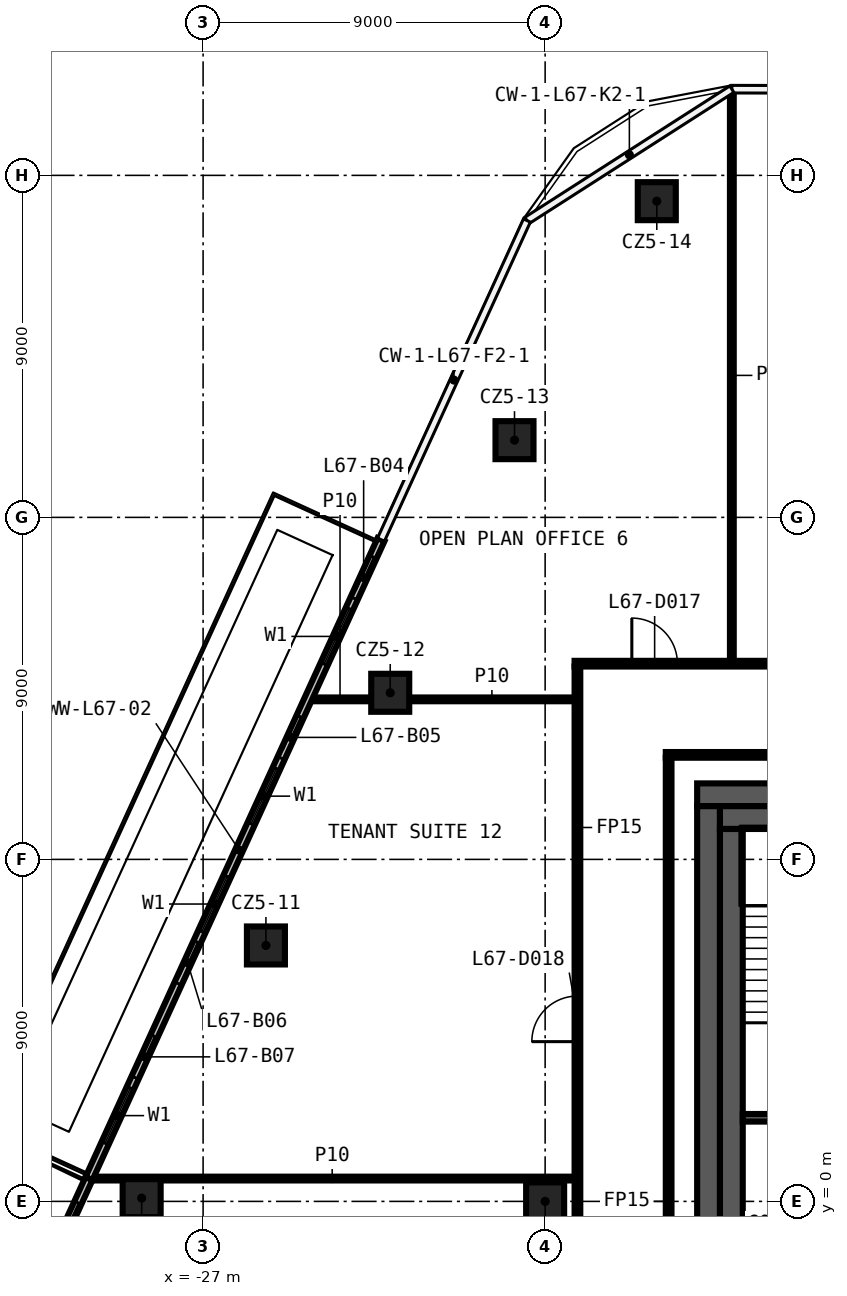
"""IFC4 building model, lengths in metres.
Left out: names, types, materials, properties, quantities, classifications, styles, units other than length and angle.
Written with IfcOpenShell. Run it as: python <this file> out.ifc"""

import sys

from ifc_helpers import new_model, si_unit, direction, frame, frame_2d, origin, origin_2d, place, context, subcontext, project, spatial, rectangle, extrude, element, fill, save


model = new_model("IFC4")
c1 = context("Model", 3, precision=1e-05, world=origin(), true_north=direction((0.0, 1.0)))
c2 = subcontext(c1, "Body", "Model", "MODEL_VIEW")
j1 = project(units=[si_unit("LENGTHUNIT", "METRE"), si_unit("PLANEANGLEUNIT", "RADIAN")], contexts=[c1])
p1 = place(None, origin())
s1 = spatial("IfcSite", under=j1, at=p1, CompositionType="ELEMENT")
p2 = place(p1, origin())
s2 = spatial("IfcBuilding", under=s1, at=p2, CompositionType="ELEMENT")
p3 = place(p2, frame((0.0, 0.0, 315.2)))
s3 = spatial("IfcBuildingStorey", under=s2, at=p3, CompositionType="ELEMENT", Elevation=315.2)
for number, where, z_axis, x_axis in (
    (1, (-28.617, 0.086, 0.0), (0.0, 0.0, 1.0), (1.0, 0.0, 0.0)),
    (2, (-25.347, 6.735, 0.0), (0.0, 0.0, 1.0), (1.0, 0.0, 0.0)),
    (3, (-22.076, 13.384, 0.0), (0.0, 0.0, 1.0), (1.0, 0.0, 0.0)),
    (4, (-18.806, 20.032, 0.0), (0.0, 0.0, 1.0), (1.0, 0.0, 0.0)),
    (5, (-15.062, 26.321, 0.0), (0.0, 0.0, 1.0), (1.0, 0.0, 0.0)),
    (6, (-18.0, 0.0, 0.0), (0.0, 0.0, 1.0), (1.0, 0.0, 0.0)),
):
    element("IfcColumn", number, at=place(p3, frame(where, z_axis=z_axis, x_axis=x_axis)), inside=s3, PredefinedType="COLUMN", context=c2, shape_type="SweptSolid", body=[
        extrude(rectangle(XDim=1.0, YDim=1.0, at=origin_2d()), origin(), (0.0, 0.0, 1.0), 3.82),
    ])
p4 = place(p3, frame((-29.981, 0.601, 0.0), z_axis=(0.0, 0.0, 1.0), x_axis=(1.0, 0.0, 0.0)))
e7 = element("IfcWall", 7, at=p4, inside=s3, PredefinedType="PARTITIONING", context=c2, shape_type="SweptSolid", body=[
    extrude(rectangle(XDim=12.756, YDim=0.1, at=frame_2d((6.378, 0.0))), origin(), (0.0, 0.0, 1.0), 3.82),
])
p5 = place(p3, frame((-14.825, 11.75, 0.0), z_axis=(0.0, 0.0, 1.0), x_axis=(1.0, 0.0, 0.0)))
e8 = element("IfcWall", 8, at=p5, inside=s3, PredefinedType="PARTITIONING", context=c2, shape_type="SweptSolid", body=[
    extrude(rectangle(XDim=16.625, YDim=0.15, at=frame_2d((8.312, 0.0))), origin(), (0.0, 0.0, 1.0), 3.82),
])
p6 = place(p3, frame((-24.218, 13.211, 0.0), z_axis=(0.0, 0.0, 1.0), x_axis=(1.0, 0.0, 0.0)))
e9 = element("IfcWall", 9, at=p6, inside=s3, PredefinedType="PARTITIONING", context=c2, shape_type="SweptSolid", body=[
    extrude(rectangle(XDim=1.642, YDim=0.1, at=frame_2d((0.821, 0.0))), origin(), (0.0, 0.0, 1.0), 3.82),
])
p7 = place(p3, frame((-21.576, 13.211, 0.0), z_axis=(0.0, 0.0, 1.0), x_axis=(1.0, 0.0, 0.0)))
e10 = element("IfcWall", 10, at=p7, inside=s3, PredefinedType="PARTITIONING", context=c2, shape_type="SweptSolid", body=[
    extrude(rectangle(XDim=4.351, YDim=0.1, at=frame_2d((2.175, 0.0))), origin(), (0.0, 0.0, 1.0), 3.82),
])
p8 = place(p3, frame((-17.225, 14.15, 0.0), z_axis=(0.0, 0.0, 1.0), x_axis=(1.0, 0.0, 0.0)))
e11 = element("IfcWall", 11, at=p8, inside=s3, PredefinedType="PARTITIONING", context=c2, shape_type="SweptSolid", body=[
    extrude(rectangle(XDim=34.45, YDim=0.15, at=frame_2d((17.225, 0.0))), origin(), (0.0, 0.0, 1.0), 3.82),
])
p9 = place(p8, frame((31.607, 0.0, 0.0)))
e12 = element("IfcOpeningElement", 12, at=p9, cuts=e11, PredefinedType="OPENING", context=c2, shape_type="SweptSolid", body=[
    extrude(rectangle(XDim=1.2, YDim=2.1, at=frame_2d((0.6, 1.05))), frame((0.0, 0.085, 0.0), z_axis=(0.0, -1.0, 0.0), x_axis=(1.0, 0.0, 0.0)), (0.0, 0.0, 1.0), 0.17),
])
p10 = place(p8, frame((25.936, 0.0, 0.0)))
e13 = element("IfcOpeningElement", 13, at=p10, cuts=e11, PredefinedType="OPENING", context=c2, shape_type="SweptSolid", body=[
    extrude(rectangle(XDim=1.2, YDim=2.1, at=frame_2d((0.6, 1.05))), frame((0.0, 0.085, 0.0), z_axis=(0.0, -1.0, 0.0), x_axis=(1.0, 0.0, 0.0)), (0.0, 0.0, 1.0), 0.17),
])
p11 = place(p8, frame((17.707, 0.0, 0.0)))
e14 = element("IfcOpeningElement", 14, at=p11, cuts=e11, PredefinedType="OPENING", context=c2, shape_type="SweptSolid", body=[
    extrude(rectangle(XDim=1.2, YDim=2.1, at=frame_2d((0.6, 1.05))), frame((0.0, 0.085, 0.0), z_axis=(0.0, -1.0, 0.0), x_axis=(1.0, 0.0, 0.0)), (0.0, 0.0, 1.0), 0.17),
])
p12 = place(p8, frame((10.617, 0.0, 0.0)))
e15 = element("IfcOpeningElement", 15, at=p12, cuts=e11, PredefinedType="OPENING", context=c2, shape_type="SweptSolid", body=[
    extrude(rectangle(XDim=1.2, YDim=2.1, at=frame_2d((0.6, 1.05))), frame((0.0, 0.085, 0.0), z_axis=(0.0, -1.0, 0.0), x_axis=(1.0, 0.0, 0.0)), (0.0, 0.0, 1.0), 0.17),
])
p13 = place(p8, frame((5.896, 0.0, 0.0)))
e16 = element("IfcOpeningElement", 16, at=p13, cuts=e11, PredefinedType="OPENING", context=c2, shape_type="SweptSolid", body=[
    extrude(rectangle(XDim=1.2, YDim=2.1, at=frame_2d((0.6, 1.05))), frame((0.0, 0.085, 0.0), z_axis=(0.0, -1.0, 0.0), x_axis=(1.0, 0.0, 0.0)), (0.0, 0.0, 1.0), 0.17),
])
p14 = place(p8, frame((1.506, 0.0, 0.0)))
e17 = element("IfcOpeningElement", 17, at=p14, cuts=e11, PredefinedType="OPENING", context=c2, shape_type="SweptSolid", body=[
    extrude(rectangle(XDim=1.2, YDim=2.1, at=frame_2d((0.6, 1.05))), frame((0.0, 0.085, 0.0), z_axis=(0.0, -1.0, 0.0), x_axis=(1.0, 0.0, 0.0)), (0.0, 0.0, 1.0), 0.17),
])
p15 = place(p3, frame((-13.087, 14.225, 0.0), z_axis=(0.0, 0.0, 1.0), x_axis=(0.0, 1.0, 0.0)))
e18 = element("IfcWall", 18, at=p15, inside=s3, PredefinedType="PARTITIONING", context=c2, shape_type="SweptSolid", body=[
    extrude(rectangle(XDim=15.023, YDim=0.1, at=frame_2d((7.511, 0.0))), origin(), (0.0, 0.0, 1.0), 3.82),
])
p16 = place(p3, frame((-14.75, -11.675, 0.0), z_axis=(0.0, 0.0, 1.0), x_axis=(0.0, 1.0, 0.0)))
e19 = element("IfcWall", 19, at=p16, inside=s3, PredefinedType="PARTITIONING", context=c2, shape_type="SweptSolid", body=[
    extrude(rectangle(XDim=23.35, YDim=0.15, at=frame_2d((11.675, 0.0))), origin(), (0.0, 0.0, 1.0), 3.82),
])
p17 = place(p3, frame((-17.15, -14.075, 0.0), z_axis=(0.0, 0.0, 1.0), x_axis=(0.0, 1.0, 0.0)))
e20 = element("IfcWall", 20, at=p17, inside=s3, PredefinedType="PARTITIONING", context=c2, shape_type="SweptSolid", body=[
    extrude(rectangle(XDim=28.15, YDim=0.15, at=frame_2d((14.075, 0.0))), origin(), (0.0, 0.0, 1.0), 3.82),
])
p18 = place(p17, frame((10.867, 0.0, 0.0)))
e21 = element("IfcOpeningElement", 21, at=p18, cuts=e20, PredefinedType="OPENING", context=c2, shape_type="SweptSolid", body=[
    extrude(rectangle(XDim=1.2, YDim=2.1, at=frame_2d((0.6, 1.05))), frame((0.0, 0.085, 0.0), z_axis=(0.0, -1.0, 0.0), x_axis=(1.0, 0.0, 0.0)), (0.0, 0.0, 1.0), 0.17),
])
p19 = place(p17, frame((3.801, 0.0, 0.0)))
e22 = element("IfcOpeningElement", 22, at=p19, cuts=e20, PredefinedType="OPENING", context=c2, shape_type="SweptSolid", body=[
    extrude(rectangle(XDim=1.2, YDim=2.1, at=frame_2d((0.6, 1.05))), frame((0.0, 0.085, 0.0), z_axis=(0.0, -1.0, 0.0), x_axis=(1.0, 0.0, 0.0)), (0.0, 0.0, 1.0), 0.17),
])
p20 = place(p17, frame((18.279, 0.0, 0.0)))
e23 = element("IfcOpeningElement", 23, at=p20, cuts=e20, PredefinedType="OPENING", context=c2, shape_type="SweptSolid", body=[
    extrude(rectangle(XDim=1.2, YDim=2.1, at=frame_2d((0.6, 1.05))), frame((0.0, 0.085, 0.0), z_axis=(0.0, -1.0, 0.0), x_axis=(1.0, 0.0, 0.0)), (0.0, 0.0, 1.0), 0.17),
])
p21 = place(p3, frame((-22.318, 17.414, 0.0), z_axis=(0.0, 0.0, 1.0), x_axis=(-0.415710447513, -0.909497016943, 0.0)))
e24 = element("IfcWall", 24, at=p21, inside=s3, PredefinedType="SOLIDWALL", context=c2, shape_type="SweptSolid", body=[
    extrude(rectangle(XDim=18.487, YDim=0.2, at=frame_2d((9.243, 0.0))), origin(), (0.0, 0.0, 1.0), 3.82),
])
p22 = place(p21, frame((2.0, 0.0, 0.6)))
e25 = element("IfcOpeningElement", 25, at=p22, cuts=e24, PredefinedType="OPENING", context=c2, shape_type="SweptSolid", body=[
    extrude(rectangle(XDim=1.6, YDim=2.4, at=frame_2d((0.8, 1.2))), frame((0.0, 0.11, 0.0), z_axis=(0.0, -1.0, 0.0), x_axis=(1.0, 0.0, 0.0)), (0.0, 0.0, 1.0), 0.22),
])
p23 = place(p21, frame((0.5, 0.0, 0.0)))
e26 = element("IfcOpeningElement", 26, at=p23, cuts=e24, PredefinedType="OPENING", context=c2, shape_type="SweptSolid", body=[
    extrude(rectangle(XDim=1.2, YDim=2.4, at=frame_2d((0.6, 1.2))), frame((0.0, 0.11, 0.0), z_axis=(0.0, -1.0, 0.0), x_axis=(1.0, 0.0, 0.0)), (0.0, 0.0, 1.0), 0.22),
])
p24 = place(p21, frame((6.622, 0.0, 0.6)))
e27 = element("IfcOpeningElement", 27, at=p24, cuts=e24, PredefinedType="OPENING", context=c2, shape_type="SweptSolid", body=[
    extrude(rectangle(XDim=1.6, YDim=2.4, at=frame_2d((0.8, 1.2))), frame((0.0, 0.11, 0.0), z_axis=(0.0, -1.0, 0.0), x_axis=(1.0, 0.0, 0.0)), (0.0, 0.0, 1.0), 0.22),
])
p25 = place(p21, frame((5.122, 0.0, 0.0)))
e28 = element("IfcOpeningElement", 28, at=p25, cuts=e24, PredefinedType="OPENING", context=c2, shape_type="SweptSolid", body=[
    extrude(rectangle(XDim=1.2, YDim=2.4, at=frame_2d((0.6, 1.2))), frame((0.0, 0.11, 0.0), z_axis=(0.0, -1.0, 0.0), x_axis=(1.0, 0.0, 0.0)), (0.0, 0.0, 1.0), 0.22),
])
p26 = place(p21, frame((9.743, 0.0, 0.6)))
e29 = element("IfcOpeningElement", 29, at=p26, cuts=e24, PredefinedType="OPENING", context=c2, shape_type="SweptSolid", body=[
    extrude(rectangle(XDim=1.6, YDim=2.4, at=frame_2d((0.8, 1.2))), frame((0.0, 0.11, 0.0), z_axis=(0.0, -1.0, 0.0), x_axis=(1.0, 0.0, 0.0)), (0.0, 0.0, 1.0), 0.22),
])
p27 = place(p21, frame((11.643, 0.0, 0.0)))
e30 = element("IfcOpeningElement", 30, at=p27, cuts=e24, PredefinedType="OPENING", context=c2, shape_type="SweptSolid", body=[
    extrude(rectangle(XDim=1.2, YDim=2.4, at=frame_2d((0.6, 1.2))), frame((0.0, 0.11, 0.0), z_axis=(0.0, -1.0, 0.0), x_axis=(1.0, 0.0, 0.0)), (0.0, 0.0, 1.0), 0.22),
])
p28 = place(p21, frame((15.865, 0.0, 0.6)))
e31 = element("IfcOpeningElement", 31, at=p28, cuts=e24, PredefinedType="OPENING", context=c2, shape_type="SweptSolid", body=[
    extrude(rectangle(XDim=1.6, YDim=2.4, at=frame_2d((0.8, 1.2))), frame((0.0, 0.11, 0.0), z_axis=(0.0, -1.0, 0.0), x_axis=(1.0, 0.0, 0.0)), (0.0, 0.0, 1.0), 0.22),
])
p29 = place(p21, frame((14.365, 0.0, 0.0)))
e32 = element("IfcOpeningElement", 32, at=p29, cuts=e24, PredefinedType="OPENING", context=c2, shape_type="SweptSolid", body=[
    extrude(rectangle(XDim=1.2, YDim=2.4, at=frame_2d((0.6, 1.2))), frame((0.0, 0.11, 0.0), z_axis=(0.0, -1.0, 0.0), x_axis=(1.0, 0.0, 0.0)), (0.0, 0.0, 1.0), 0.22),
])
p30 = place(p3, frame((-30.003, 0.601, 0.0), z_axis=(0.0, 0.0, 1.0), x_axis=(-0.415728482872, -0.909488773174, 0.0)))
e33 = element("IfcWall", 33, at=p30, inside=s3, PredefinedType="SOLIDWALL", context=c2, shape_type="SweptSolid", body=[
    extrude(rectangle(XDim=4.612, YDim=0.2, at=frame_2d((2.306, 0.0))), origin(), (0.0, 0.0, 1.0), 3.82),
])
p31 = place(p30, frame((2.2, 0.0, 0.6)))
e34 = element("IfcOpeningElement", 34, at=p31, cuts=e33, PredefinedType="OPENING", context=c2, shape_type="SweptSolid", body=[
    extrude(rectangle(XDim=1.6, YDim=2.4, at=frame_2d((0.8, 1.2))), frame((0.0, 0.11, 0.0), z_axis=(0.0, -1.0, 0.0), x_axis=(1.0, 0.0, 0.0)), (0.0, 0.0, 1.0), 0.22),
])
p32 = place(p30, frame((0.7, 0.0, 0.0)))
e35 = element("IfcOpeningElement", 35, at=p32, cuts=e33, PredefinedType="OPENING", context=c2, shape_type="SweptSolid", body=[
    extrude(rectangle(XDim=1.2, YDim=2.4, at=frame_2d((0.6, 1.2))), frame((0.0, 0.11, 0.0), z_axis=(0.0, -1.0, 0.0), x_axis=(1.0, 0.0, 0.0)), (0.0, 0.0, 1.0), 0.22),
])
p33 = place(p3, frame((-14.0, 10.7, 0.0), z_axis=(0.0, 0.0, 1.0), x_axis=(1.0, 0.0, 0.0)))
e36 = element("IfcWall", 36, at=p33, inside=s3, PredefinedType="SHEAR", context=c2, shape_type="SweptSolid", body=[
    extrude(rectangle(XDim=28.0, YDim=0.6, at=frame_2d((14.0, 0.0))), origin(), (0.0, 0.0, 1.0), 3.82),
])
p34 = place(p33, frame((15.9, 0.0, 0.0)))
e37 = element("IfcOpeningElement", 37, at=p34, cuts=e36, PredefinedType="OPENING", context=c2, shape_type="SweptSolid", body=[
    extrude(rectangle(XDim=1.6, YDim=2.1, at=frame_2d((0.8, 1.05))), frame((0.0, 0.31, 0.0), z_axis=(0.0, -1.0, 0.0), x_axis=(1.0, 0.0, 0.0)), (0.0, 0.0, 1.0), 0.62),
])
p35 = place(p3, frame((-13.7, -10.4, 0.0), z_axis=(0.0, 0.0, 1.0), x_axis=(0.0, 1.0, 0.0)))
e38 = element("IfcWall", 38, at=p35, inside=s3, PredefinedType="SHEAR", context=c2, shape_type="SweptSolid", body=[
    extrude(rectangle(XDim=20.8, YDim=0.6, at=frame_2d((10.4, 0.0))), origin(), (0.0, 0.0, 1.0), 3.82),
])
p36 = place(p3, frame((-13.4, 10.1, 0.0), z_axis=(0.0, 0.0, 1.0), x_axis=(1.0, 0.0, 0.0)))
e39 = element("IfcWall", 39, at=p36, inside=s3, PredefinedType="SHEAR", context=c2, shape_type="SweptSolid", body=[
    extrude(rectangle(XDim=14.9, YDim=0.6, at=frame_2d((7.45, 0.0))), origin(), (0.0, 0.0, 1.0), 3.82),
])
p37 = place(p3, frame((-13.1, -9.8, 0.0), z_axis=(0.0, 0.0, 1.0), x_axis=(0.0, 1.0, 0.0)))
e40 = element("IfcWall", 40, at=p37, inside=s3, PredefinedType="SHEAR", context=c2, shape_type="SweptSolid", body=[
    extrude(rectangle(XDim=19.6, YDim=0.6, at=frame_2d((9.8, 0.0))), origin(), (0.0, 0.0, 1.0), 3.82),
])
p38 = place(p3, frame((-9.45, 2.2, 0.0), z_axis=(0.0, 0.0, 1.0), x_axis=(-1.0, 0.0, 0.0)))
e41 = element("IfcWall", 41, at=p38, inside=s3, PredefinedType="SHEAR", context=c2, shape_type="SweptSolid", body=[
    extrude(rectangle(XDim=3.35, YDim=0.2, at=frame_2d((1.675, 0.0))), origin(), (0.0, 0.0, 1.0), 3.82),
])
p39 = place(p14, origin())
e42 = element("IfcDoor", 42, at=p39, inside=s3, OperationType="SINGLE_SWING_RIGHT", PredefinedType="DOOR", context=c2, shape_type="SweptSolid", body=[
    extrude(rectangle(XDim=1.2, YDim=2.1, at=frame_2d((0.6, 1.05))), frame((0.0, 0.025, 0.0), z_axis=(0.0, -1.0, 0.0), x_axis=(1.0, 0.0, 0.0)), (0.0, 0.0, 1.0), 0.05),
])
fill(e17, e42)
p40 = place(p20, origin())
e43 = element("IfcDoor", 43, at=p40, inside=s3, OperationType="SINGLE_SWING_LEFT", PredefinedType="DOOR", context=c2, shape_type="SweptSolid", body=[
    extrude(rectangle(XDim=1.2, YDim=2.1, at=frame_2d((0.6, 1.05))), frame((0.0, 0.025, 0.0), z_axis=(0.0, -1.0, 0.0), x_axis=(1.0, 0.0, 0.0)), (0.0, 0.0, 1.0), 0.05),
])
fill(e23, e43)
p41 = place(p22, origin())
e44 = element("IfcWindow", 44, at=p41, inside=s3, PartitioningType="SINGLE_PANEL", PredefinedType="WINDOW", context=c2, shape_type="SweptSolid", body=[
    extrude(rectangle(XDim=1.6, YDim=2.4, at=frame_2d((0.8, 1.2))), frame((0.0, 0.03, 0.0), z_axis=(0.0, -1.0, 0.0), x_axis=(1.0, 0.0, 0.0)), (0.0, 0.0, 1.0), 0.06),
])
fill(e25, e44)
p42 = place(p23, origin())
e45 = element("IfcDoor", 45, at=p42, inside=s3, OperationType="SLIDING_TO_LEFT", PredefinedType="DOOR", context=c2, shape_type="SweptSolid", body=[
    extrude(rectangle(XDim=1.2, YDim=2.4, at=frame_2d((0.6, 1.2))), frame((0.0, 0.025, 0.0), z_axis=(0.0, -1.0, 0.0), x_axis=(1.0, 0.0, 0.0)), (0.0, 0.0, 1.0), 0.05),
])
fill(e26, e45)
p43 = place(p24, origin())
e46 = element("IfcWindow", 46, at=p43, inside=s3, PartitioningType="SINGLE_PANEL", PredefinedType="WINDOW", context=c2, shape_type="SweptSolid", body=[
    extrude(rectangle(XDim=1.6, YDim=2.4, at=frame_2d((0.8, 1.2))), frame((0.0, 0.03, 0.0), z_axis=(0.0, -1.0, 0.0), x_axis=(1.0, 0.0, 0.0)), (0.0, 0.0, 1.0), 0.06),
])
fill(e27, e46)
p44 = place(p25, origin())
e47 = element("IfcDoor", 47, at=p44, inside=s3, OperationType="SLIDING_TO_LEFT", PredefinedType="DOOR", context=c2, shape_type="SweptSolid", body=[
    extrude(rectangle(XDim=1.2, YDim=2.4, at=frame_2d((0.6, 1.2))), frame((0.0, 0.025, 0.0), z_axis=(0.0, -1.0, 0.0), x_axis=(1.0, 0.0, 0.0)), (0.0, 0.0, 1.0), 0.05),
])
fill(e28, e47)
p45 = place(p26, origin())
e48 = element("IfcWindow", 48, at=p45, inside=s3, PartitioningType="SINGLE_PANEL", PredefinedType="WINDOW", context=c2, shape_type="SweptSolid", body=[
    extrude(rectangle(XDim=1.6, YDim=2.4, at=frame_2d((0.8, 1.2))), frame((0.0, 0.03, 0.0), z_axis=(0.0, -1.0, 0.0), x_axis=(1.0, 0.0, 0.0)), (0.0, 0.0, 1.0), 0.06),
])
fill(e29, e48)
p46 = place(p27, origin())
e49 = element("IfcDoor", 49, at=p46, inside=s3, OperationType="SLIDING_TO_LEFT", PredefinedType="DOOR", context=c2, shape_type="SweptSolid", body=[
    extrude(rectangle(XDim=1.2, YDim=2.4, at=frame_2d((0.6, 1.2))), frame((0.0, 0.025, 0.0), z_axis=(0.0, -1.0, 0.0), x_axis=(1.0, 0.0, 0.0)), (0.0, 0.0, 1.0), 0.05),
])
fill(e30, e49)
p47 = place(p28, origin())
e50 = element("IfcWindow", 50, at=p47, inside=s3, PartitioningType="SINGLE_PANEL", PredefinedType="WINDOW", context=c2, shape_type="SweptSolid", body=[
    extrude(rectangle(XDim=1.6, YDim=2.4, at=frame_2d((0.8, 1.2))), frame((0.0, 0.03, 0.0), z_axis=(0.0, -1.0, 0.0), x_axis=(1.0, 0.0, 0.0)), (0.0, 0.0, 1.0), 0.06),
])
fill(e31, e50)
p48 = place(p29, origin())
e51 = element("IfcDoor", 51, at=p48, inside=s3, OperationType="SLIDING_TO_LEFT", PredefinedType="DOOR", context=c2, shape_type="SweptSolid", body=[
    extrude(rectangle(XDim=1.2, YDim=2.4, at=frame_2d((0.6, 1.2))), frame((0.0, 0.025, 0.0), z_axis=(0.0, -1.0, 0.0), x_axis=(1.0, 0.0, 0.0)), (0.0, 0.0, 1.0), 0.05),
])
fill(e32, e51)
p49 = place(p32, origin())
e52 = element("IfcDoor", 52, at=p49, inside=s3, OperationType="SLIDING_TO_LEFT", PredefinedType="DOOR", context=c2, shape_type="SweptSolid", body=[
    extrude(rectangle(XDim=1.2, YDim=2.4, at=frame_2d((0.6, 1.2))), frame((0.0, 0.025, 0.0), z_axis=(0.0, -1.0, 0.0), x_axis=(1.0, 0.0, 0.0)), (0.0, 0.0, 1.0), 0.05),
])
fill(e35, e52)
save(model, sys.argv[1])
